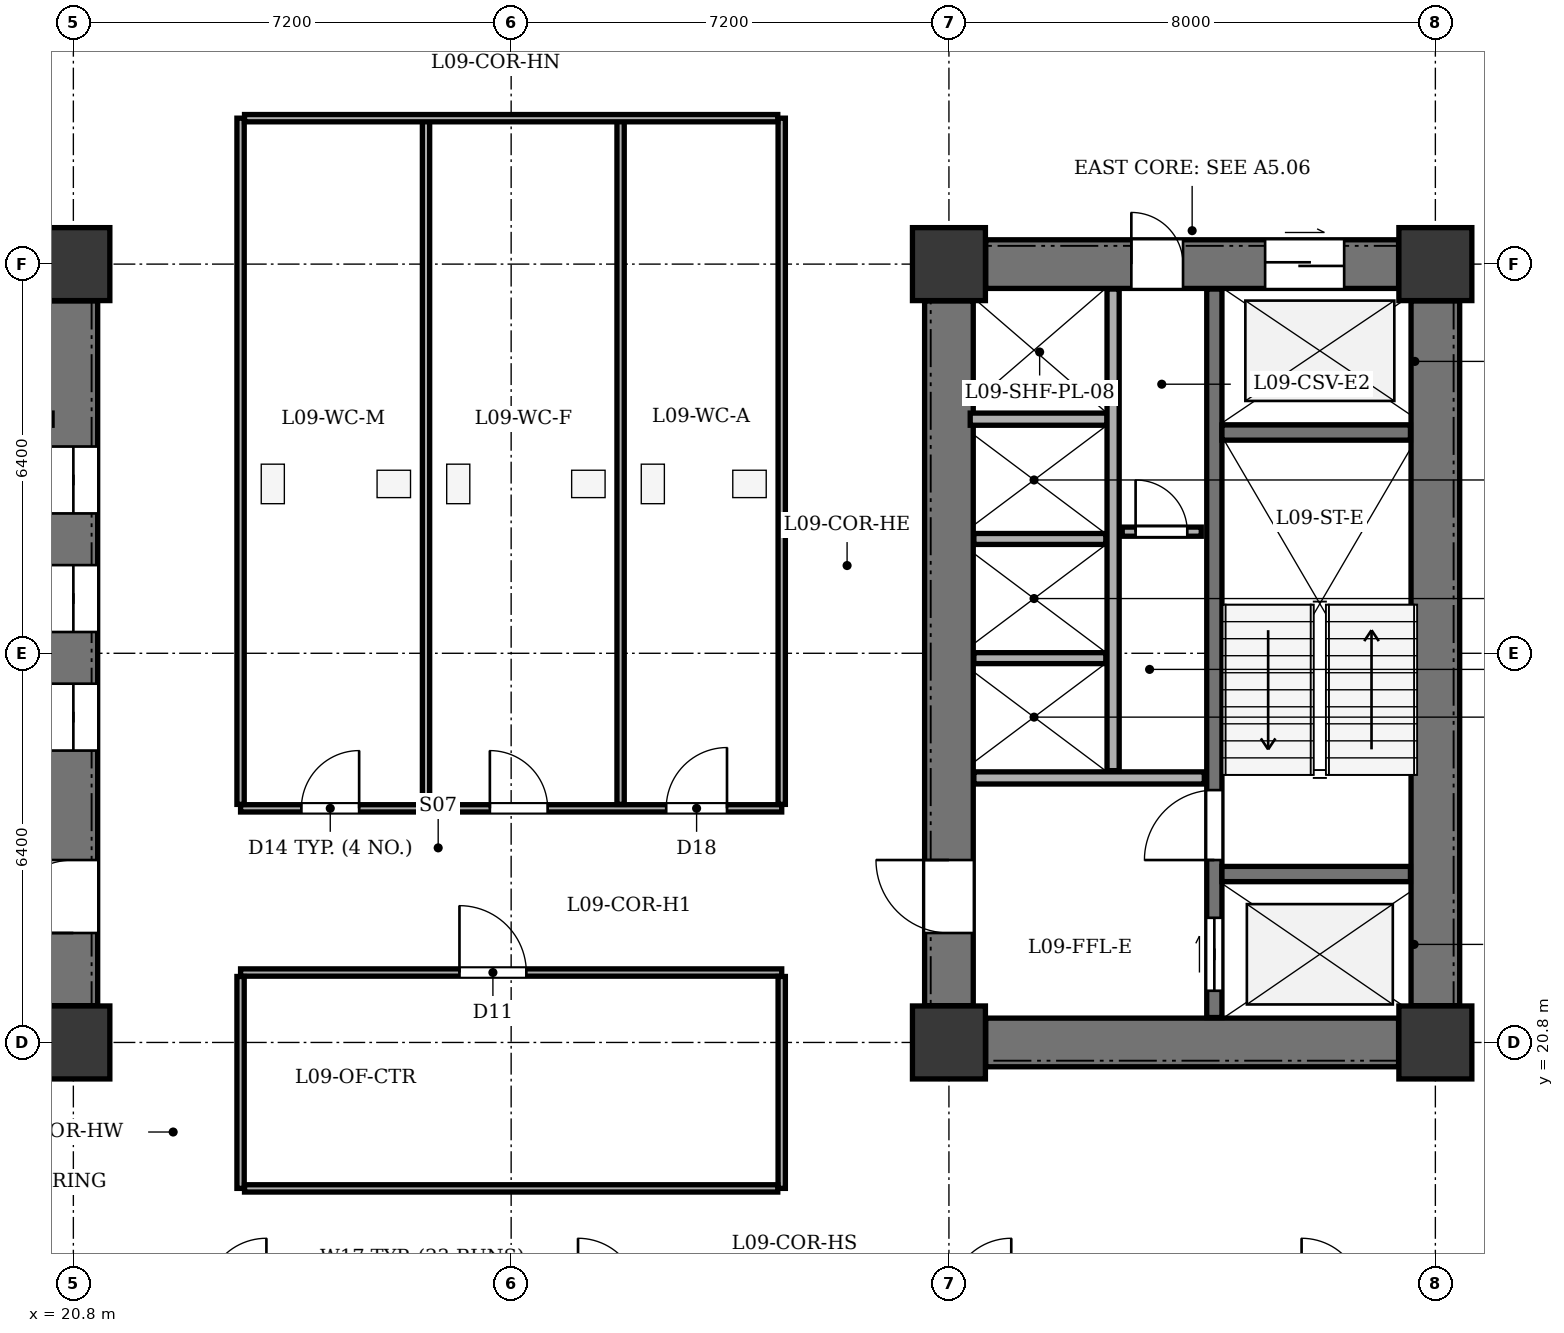
"""IFC4 building model, lengths in metres.
Left out: names, types, materials, properties, quantities, classifications, styles, units other than length and angle.
Written with IfcOpenShell. Run it as: python <this file> out.ifc"""

import sys

from ifc_helpers import new_model, si_unit, direction, frame, frame_2d, origin, origin_2d, place, context, subcontext, project, spatial, rectangle, extrude, element, fill, save


model = new_model("IFC4")
c1 = context("Model", 3, precision=1e-05, world=origin(), true_north=direction((0.0, 1.0)))
c2 = subcontext(c1, "Body", "Model", "MODEL_VIEW")
j1 = project(units=[si_unit("LENGTHUNIT", "METRE"), si_unit("PLANEANGLEUNIT", "RADIAN")], contexts=[c1])
p1 = place(None, origin())
s1 = spatial("IfcSite", under=j1, at=p1, CompositionType="ELEMENT")
p2 = place(p1, origin())
s2 = spatial("IfcBuilding", under=s1, at=p2, CompositionType="ELEMENT")
p3 = place(p2, frame((0.0, 0.0, 39.9)))
s3 = spatial("IfcBuildingStorey", under=s2, at=p3, CompositionType="ELEMENT", Elevation=39.9)
for number, where, z_axis, x_axis in (
    (1, (20.8, 20.8, 0.0), (0.0, 0.0, 1.0), (1.0, 0.0, 0.0)),
    (2, (20.8, 33.6, 0.0), (0.0, 0.0, 1.0), (1.0, 0.0, 0.0)),
    (3, (35.2, 20.8, 0.0), (0.0, 0.0, 1.0), (1.0, 0.0, 0.0)),
    (4, (43.2, 20.8, 0.0), (0.0, 0.0, 1.0), (1.0, 0.0, 0.0)),
    (5, (35.2, 33.6, 0.0), (0.0, 0.0, 1.0), (1.0, 0.0, 0.0)),
    (6, (43.2, 33.6, 0.0), (0.0, 0.0, 1.0), (1.0, 0.0, 0.0)),
):
    element("IfcColumn", number, at=place(p3, frame(where, z_axis=z_axis, x_axis=x_axis)), inside=s3, PredefinedType="COLUMN", context=c2, shape_type="SweptSolid", body=[
        extrude(rectangle(XDim=1.2, YDim=1.2, at=origin_2d()), origin(), (0.0, 0.0, 1.0), 3.9),
    ])
p4 = place(p3, frame((20.8, 21.405, 0.0), z_axis=(0.0, 0.0, 1.0), x_axis=(0.0, 1.0, 0.0)))
e7 = element("IfcWall", 7, at=p4, inside=s3, PredefinedType="SHEAR", context=c2, shape_type="SweptSolid", body=[
    extrude(rectangle(XDim=11.59, YDim=0.8, at=frame_2d((5.795, 0.0))), origin(), (0.0, 0.0, 1.0), 3.6),
])
p5 = place(p4, frame((1.195, 0.0, 0.0)))
e8 = element("IfcOpeningElement", 8, at=p5, cuts=e7, PredefinedType="OPENING", context=c2, shape_type="SweptSolid", body=[
    extrude(rectangle(XDim=1.2, YDim=2.15, at=frame_2d((0.6, 1.075))), frame((0.0, 0.41, 0.0), z_axis=(0.0, -1.0, 0.0), x_axis=(1.0, 0.0, 0.0)), (0.0, 0.0, 1.0), 0.82),
])
p6 = place(p4, frame((4.195, 0.0, 0.0)))
e9 = element("IfcOpeningElement", 9, at=p6, cuts=e7, PredefinedType="OPENING", context=c2, shape_type="SweptSolid", body=[
    extrude(rectangle(XDim=1.1, YDim=2.1, at=frame_2d((0.55, 1.05))), frame((0.0, 0.41, 0.0), z_axis=(0.0, -1.0, 0.0), x_axis=(1.0, 0.0, 0.0)), (0.0, 0.0, 1.0), 0.82),
])
p7 = place(p4, frame((6.145, 0.0, 0.0)))
e10 = element("IfcOpeningElement", 10, at=p7, cuts=e7, PredefinedType="OPENING", context=c2, shape_type="SweptSolid", body=[
    extrude(rectangle(XDim=1.1, YDim=2.1, at=frame_2d((0.55, 1.05))), frame((0.0, 0.41, 0.0), z_axis=(0.0, -1.0, 0.0), x_axis=(1.0, 0.0, 0.0)), (0.0, 0.0, 1.0), 0.82),
])
p8 = place(p4, frame((8.095, 0.0, 0.0)))
e11 = element("IfcOpeningElement", 11, at=p8, cuts=e7, PredefinedType="OPENING", context=c2, shape_type="SweptSolid", body=[
    extrude(rectangle(XDim=1.1, YDim=2.1, at=frame_2d((0.55, 1.05))), frame((0.0, 0.41, 0.0), z_axis=(0.0, -1.0, 0.0), x_axis=(1.0, 0.0, 0.0)), (0.0, 0.0, 1.0), 0.82),
])
p9 = place(p3, frame((43.2, 21.405, 0.0), z_axis=(0.0, 0.0, 1.0), x_axis=(0.0, 1.0, 0.0)))
e12 = element("IfcWall", 12, at=p9, inside=s3, PredefinedType="SHEAR", context=c2, shape_type="SweptSolid", body=[
    extrude(rectangle(XDim=11.59, YDim=0.8, at=frame_2d((5.795, 0.0))), origin(), (0.0, 0.0, 1.0), 3.6),
])
p10 = place(p3, frame((35.805, 20.8, 0.0), z_axis=(0.0, 0.0, 1.0), x_axis=(1.0, 0.0, 0.0)))
e13 = element("IfcWall", 13, at=p10, inside=s3, PredefinedType="SHEAR", context=c2, shape_type="SweptSolid", body=[
    extrude(rectangle(XDim=6.79, YDim=0.8, at=frame_2d((3.395, 0.0))), origin(), (0.0, 0.0, 1.0), 3.6),
])
p11 = place(p3, frame((35.805, 33.6, 0.0), z_axis=(0.0, 0.0, 1.0), x_axis=(1.0, 0.0, 0.0)))
e14 = element("IfcWall", 14, at=p11, inside=s3, PredefinedType="SHEAR", context=c2, shape_type="SweptSolid", body=[
    extrude(rectangle(XDim=6.79, YDim=0.8, at=frame_2d((3.395, 0.0))), origin(), (0.0, 0.0, 1.0), 3.6),
])
p12 = place(p11, frame((4.595, 0.0, 0.0)))
e15 = element("IfcOpeningElement", 15, at=p12, cuts=e14, PredefinedType="OPENING", context=c2, shape_type="SweptSolid", body=[
    extrude(rectangle(XDim=1.3, YDim=2.15, at=frame_2d((0.65, 1.075))), frame((0.0, 0.41, 0.0), z_axis=(0.0, -1.0, 0.0), x_axis=(1.0, 0.0, 0.0)), (0.0, 0.0, 1.0), 0.82),
])
p13 = place(p11, frame((2.395, 0.0, 0.0)))
e16 = element("IfcOpeningElement", 16, at=p13, cuts=e14, PredefinedType="OPENING", context=c2, shape_type="SweptSolid", body=[
    extrude(rectangle(XDim=0.85, YDim=2.02, at=frame_2d((0.425, 1.01))), frame((0.0, 0.41, 0.0), z_axis=(0.0, -1.0, 0.0), x_axis=(1.0, 0.0, 0.0)), (0.0, 0.0, 1.0), 0.82),
])
p14 = place(p3, frame((35.2, 21.405, 0.0), z_axis=(0.0, 0.0, 1.0), x_axis=(0.0, 1.0, 0.0)))
e17 = element("IfcWall", 17, at=p14, inside=s3, PredefinedType="SHEAR", context=c2, shape_type="SweptSolid", body=[
    extrude(rectangle(XDim=11.59, YDim=0.8, at=frame_2d((5.795, 0.0))), origin(), (0.0, 0.0, 1.0), 3.6),
])
p15 = place(p14, frame((1.195, 0.0, 0.0)))
e18 = element("IfcOpeningElement", 18, at=p15, cuts=e17, PredefinedType="OPENING", context=c2, shape_type="SweptSolid", body=[
    extrude(rectangle(XDim=1.2, YDim=2.15, at=frame_2d((0.6, 1.075))), frame((0.0, 0.41, 0.0), z_axis=(0.0, -1.0, 0.0), x_axis=(1.0, 0.0, 0.0)), (0.0, 0.0, 1.0), 0.82),
])
p16 = place(p3, frame((39.565, 21.21, 0.0), z_axis=(0.0, 0.0, 1.0), x_axis=(0.0, 1.0, 0.0)))
e19 = element("IfcWall", 19, at=p16, inside=s3, PredefinedType="SHEAR", context=c2, shape_type="SweptSolid", body=[
    extrude(rectangle(XDim=11.98, YDim=0.25, at=frame_2d((5.99, 0.0))), origin(), (0.0, 0.0, 1.0), 3.6),
])
p17 = place(p16, frame((0.44, 0.0, 0.0)))
e20 = element("IfcOpeningElement", 20, at=p17, cuts=e19, PredefinedType="OPENING", context=c2, shape_type="SweptSolid", body=[
    extrude(rectangle(XDim=1.2, YDim=2.15, at=frame_2d((0.6, 1.075))), frame((0.0, 0.135, 0.0), z_axis=(0.0, -1.0, 0.0), x_axis=(1.0, 0.0, 0.0)), (0.0, 0.0, 1.0), 0.27),
])
p18 = place(p16, frame((2.59, 0.0, 0.0)))
e21 = element("IfcOpeningElement", 21, at=p18, cuts=e19, PredefinedType="OPENING", context=c2, shape_type="SweptSolid", body=[
    extrude(rectangle(XDim=1.15, YDim=2.15, at=frame_2d((0.575, 1.075))), frame((0.0, 0.135, 0.0), z_axis=(0.0, -1.0, 0.0), x_axis=(1.0, 0.0, 0.0)), (0.0, 0.0, 1.0), 0.27),
])
for number, where, z_axis, x_axis in (
    (22, (39.69, 23.57, 0.0), (0.0, 0.0, 1.0), (1.0, 0.0, 0.0)),
    (23, (39.69, 30.83, 0.0), (0.0, 0.0, 1.0), (1.0, 0.0, 0.0)),
):
    element("IfcWall", number, at=place(p3, frame(where, z_axis=z_axis, x_axis=x_axis)), inside=s3, PredefinedType="SHEAR", context=c2, shape_type="SweptSolid", body=[
        extrude(rectangle(XDim=3.1, YDim=0.25, at=frame_2d((1.55, 0.0))), origin(), (0.0, 0.0, 1.0), 3.6),
    ])
p19 = place(p3, frame((35.61, 25.15, 0.0), z_axis=(0.0, 0.0, 1.0), x_axis=(1.0, 0.0, 0.0)))
e24 = element("IfcWall", 24, at=p19, inside=s3, PredefinedType="SOLIDWALL", context=c2, shape_type="SweptSolid", body=[
    extrude(rectangle(XDim=3.79, YDim=0.2, at=frame_2d((1.895, 0.0))), origin(), (0.0, 0.0, 1.0), 3.6),
])
p20 = place(p3, frame((35.55, 31.05, 0.0), z_axis=(0.0, 0.0, 1.0), x_axis=(1.0, 0.0, 0.0)))
e25 = element("IfcWall", 25, at=p20, inside=s3, PredefinedType="SOLIDWALL", context=c2, shape_type="SweptSolid", body=[
    extrude(rectangle(XDim=2.25, YDim=0.2, at=frame_2d((1.125, 0.0))), origin(), (0.0, 0.0, 1.0), 3.6),
])
p21 = place(p3, frame((37.9, 25.27, 0.0), z_axis=(0.0, 0.0, 1.0), x_axis=(0.0, 1.0, 0.0)))
e26 = element("IfcWall", 26, at=p21, inside=s3, PredefinedType="SOLIDWALL", context=c2, shape_type="SweptSolid", body=[
    extrude(rectangle(XDim=7.92, YDim=0.2, at=frame_2d((3.96, 0.0))), origin(), (0.0, 0.0, 1.0), 3.6),
])
for number, where, z_axis, x_axis in (
    (27, (35.61, 27.12, 0.0), (0.0, 0.0, 1.0), (1.0, 0.0, 0.0)),
    (28, (35.61, 29.08, 0.0), (0.0, 0.0, 1.0), (1.0, 0.0, 0.0)),
):
    element("IfcWall", number, at=place(p3, frame(where, z_axis=z_axis, x_axis=x_axis)), inside=s3, PredefinedType="PARTITIONING", context=c2, shape_type="SweptSolid", body=[
        extrude(rectangle(XDim=2.17, YDim=0.18, at=frame_2d((1.085, 0.0))), origin(), (0.0, 0.0, 1.0), 3.6),
    ])
p22 = place(p3, frame((38.05, 29.2, 0.0), z_axis=(0.0, 0.0, 1.0), x_axis=(1.0, 0.0, 0.0)))
e29 = element("IfcWall", 29, at=p22, inside=s3, PredefinedType="PARTITIONING", context=c2, shape_type="SweptSolid", body=[
    extrude(rectangle(XDim=1.3, YDim=0.15, at=frame_2d((0.65, 0.0))), origin(), (0.0, 0.0, 1.0), 3.6),
])
p23 = place(p22, frame((0.22, 0.0, 0.0)))
e30 = element("IfcOpeningElement", 30, at=p23, cuts=e29, PredefinedType="OPENING", context=c2, shape_type="SweptSolid", body=[
    extrude(rectangle(XDim=0.85, YDim=2.02, at=frame_2d((0.425, 1.01))), frame((0.0, 0.085, 0.0), z_axis=(0.0, -1.0, 0.0), x_axis=(1.0, 0.0, 0.0)), (0.0, 0.0, 1.0), 0.17),
])
p24 = place(p3, frame((23.55, 24.65, 0.0), z_axis=(0.0, 0.0, 1.0), x_axis=(1.0, 0.0, 0.0)))
e31 = element("IfcWall", 31, at=p24, inside=s3, PredefinedType="PARTITIONING", context=c2, shape_type="SweptSolid", body=[
    extrude(rectangle(XDim=8.9, YDim=0.12, at=frame_2d((4.45, 0.0))), origin(), (0.0, 0.0, 1.0), 3.135),
])
p25 = place(p24, frame((1.0, 0.0, 0.0)))
e32 = element("IfcOpeningElement", 32, at=p25, cuts=e31, PredefinedType="OPENING", context=c2, shape_type="SweptSolid", body=[
    extrude(rectangle(XDim=0.95, YDim=2.1, at=frame_2d((0.475, 1.05))), frame((0.0, 0.07, 0.0), z_axis=(0.0, -1.0, 0.0), x_axis=(1.0, 0.0, 0.0)), (0.0, 0.0, 1.0), 0.14),
])
p26 = place(p24, frame((4.1, 0.0, 0.0)))
e33 = element("IfcOpeningElement", 33, at=p26, cuts=e31, PredefinedType="OPENING", context=c2, shape_type="SweptSolid", body=[
    extrude(rectangle(XDim=0.95, YDim=2.1, at=frame_2d((0.475, 1.05))), frame((0.0, 0.07, 0.0), z_axis=(0.0, -1.0, 0.0), x_axis=(1.0, 0.0, 0.0)), (0.0, 0.0, 1.0), 0.14),
])
p27 = place(p24, frame((7.0, 0.0, 0.0)))
e34 = element("IfcOpeningElement", 34, at=p27, cuts=e31, PredefinedType="OPENING", context=c2, shape_type="SweptSolid", body=[
    extrude(rectangle(XDim=1.0, YDim=2.1, at=frame_2d((0.5, 1.05))), frame((0.0, 0.07, 0.0), z_axis=(0.0, -1.0, 0.0), x_axis=(1.0, 0.0, 0.0)), (0.0, 0.0, 1.0), 0.14),
])
for number, where, z_axis, x_axis in (
    (35, (23.55, 24.715, 0.0), (0.0, 0.0, 1.0), (0.0, 1.0, 0.0)),
    (36, (32.45, 24.715, 0.0), (0.0, 0.0, 1.0), (0.0, 1.0, 0.0)),
    (37, (26.6, 24.715, 0.0), (0.0, 0.0, 1.0), (0.0, 1.0, 0.0)),
):
    element("IfcWall", number, at=place(p3, frame(where, z_axis=z_axis, x_axis=x_axis)), inside=s3, PredefinedType="PARTITIONING", context=c2, shape_type="SweptSolid", body=[
        extrude(rectangle(XDim=11.285, YDim=0.12, at=frame_2d((5.643, 0.0))), origin(), (0.0, 0.0, 1.0), 3.6),
    ])
p28 = place(p3, frame((29.8, 24.715, 0.0), z_axis=(0.0, 0.0, 1.0), x_axis=(0.0, 1.0, 0.0)))
e38 = element("IfcWall", 38, at=p28, inside=s3, PredefinedType="PARTITIONING", context=c2, shape_type="SweptSolid", body=[
    extrude(rectangle(XDim=11.285, YDim=0.12, at=frame_2d((5.643, 0.0))), origin(), (0.0, 0.0, 1.0), 3.135),
])
p29 = place(p3, frame((23.615, 36.0, 0.0), z_axis=(0.0, 0.0, 1.0), x_axis=(1.0, 0.0, 0.0)))
e39 = element("IfcWall", 39, at=p29, inside=s3, PredefinedType="PARTITIONING", context=c2, shape_type="SweptSolid", body=[
    extrude(rectangle(XDim=8.77, YDim=0.12, at=frame_2d((4.385, 0.0))), origin(), (0.0, 0.0, 1.0), 3.6),
])
p30 = place(p3, frame((23.55, 21.95, 0.0), z_axis=(0.0, 0.0, 1.0), x_axis=(1.0, 0.0, 0.0)))
e40 = element("IfcWall", 40, at=p30, inside=s3, PredefinedType="PARTITIONING", context=c2, shape_type="SweptSolid", body=[
    extrude(rectangle(XDim=8.9, YDim=0.12, at=frame_2d((4.45, 0.0))), origin(), (0.0, 0.0, 1.0), 3.135),
])
p31 = place(p30, frame((3.6, 0.0, 0.0)))
e41 = element("IfcOpeningElement", 41, at=p31, cuts=e40, PredefinedType="OPENING", context=c2, shape_type="SweptSolid", body=[
    extrude(rectangle(XDim=1.1, YDim=2.15, at=frame_2d((0.55, 1.075))), frame((0.0, 0.07, 0.0), z_axis=(0.0, -1.0, 0.0), x_axis=(1.0, 0.0, 0.0)), (0.0, 0.0, 1.0), 0.14),
])
for number, where, z_axis, x_axis in (
    (42, (23.55, 18.4, 0.0), (0.0, 0.0, 1.0), (0.0, 1.0, 0.0)),
    (43, (32.45, 18.4, 0.0), (0.0, 0.0, 1.0), (0.0, 1.0, 0.0)),
):
    element("IfcWall", number, at=place(p3, frame(where, z_axis=z_axis, x_axis=x_axis)), inside=s3, PredefinedType="PARTITIONING", context=c2, shape_type="SweptSolid", body=[
        extrude(rectangle(XDim=3.485, YDim=0.12, at=frame_2d((1.743, 0.0))), origin(), (0.0, 0.0, 1.0), 3.6),
    ])
p32 = place(p3, frame((23.615, 18.4, 0.0), z_axis=(0.0, 0.0, 1.0), x_axis=(1.0, 0.0, 0.0)))
e44 = element("IfcWall", 44, at=p32, inside=s3, PredefinedType="PARTITIONING", context=c2, shape_type="SweptSolid", body=[
    extrude(rectangle(XDim=8.77, YDim=0.12, at=frame_2d((4.385, 0.0))), origin(), (0.0, 0.0, 1.0), 3.6),
])
p33 = place(p5, origin())
e45 = element("IfcDoor", 45, at=p33, inside=s3, OperationType="SINGLE_SWING_LEFT", PredefinedType="DOOR", context=c2, shape_type="SweptSolid", body=[
    extrude(rectangle(XDim=1.2, YDim=2.15, at=frame_2d((0.6, 1.075))), frame((0.0, 0.025, 0.0), z_axis=(0.0, -1.0, 0.0), x_axis=(1.0, 0.0, 0.0)), (0.0, 0.0, 1.0), 0.05),
])
fill(e8, e45)
p34 = place(p6, origin())
e46 = element("IfcDoor", 46, at=p34, inside=s3, OperationType="DOUBLE_DOOR_SLIDING", PredefinedType="DOOR", context=c2, shape_type="SweptSolid", body=[
    extrude(rectangle(XDim=1.1, YDim=2.1, at=frame_2d((0.55, 1.05))), frame((0.0, 0.025, 0.0), z_axis=(0.0, -1.0, 0.0), x_axis=(1.0, 0.0, 0.0)), (0.0, 0.0, 1.0), 0.05),
])
fill(e9, e46)
p35 = place(p7, origin())
e47 = element("IfcDoor", 47, at=p35, inside=s3, OperationType="DOUBLE_DOOR_SLIDING", PredefinedType="DOOR", context=c2, shape_type="SweptSolid", body=[
    extrude(rectangle(XDim=1.1, YDim=2.1, at=frame_2d((0.55, 1.05))), frame((0.0, 0.025, 0.0), z_axis=(0.0, -1.0, 0.0), x_axis=(1.0, 0.0, 0.0)), (0.0, 0.0, 1.0), 0.05),
])
fill(e10, e47)
p36 = place(p8, origin())
e48 = element("IfcDoor", 48, at=p36, inside=s3, OperationType="DOUBLE_DOOR_SLIDING", PredefinedType="DOOR", context=c2, shape_type="SweptSolid", body=[
    extrude(rectangle(XDim=1.1, YDim=2.1, at=frame_2d((0.55, 1.05))), frame((0.0, 0.025, 0.0), z_axis=(0.0, -1.0, 0.0), x_axis=(1.0, 0.0, 0.0)), (0.0, 0.0, 1.0), 0.05),
])
fill(e11, e48)
p37 = place(p12, origin())
e49 = element("IfcDoor", 49, at=p37, inside=s3, OperationType="DOUBLE_DOOR_SLIDING", PredefinedType="DOOR", context=c2, shape_type="SweptSolid", body=[
    extrude(rectangle(XDim=1.3, YDim=2.15, at=frame_2d((0.65, 1.075))), frame((0.0, 0.025, 0.0), z_axis=(0.0, -1.0, 0.0), x_axis=(1.0, 0.0, 0.0)), (0.0, 0.0, 1.0), 0.05),
])
fill(e15, e49)
p38 = place(p13, origin())
e50 = element("IfcDoor", 50, at=p38, inside=s3, OperationType="SINGLE_SWING_LEFT", PredefinedType="DOOR", context=c2, shape_type="SweptSolid", body=[
    extrude(rectangle(XDim=0.85, YDim=2.02, at=frame_2d((0.425, 1.01))), frame((0.0, 0.025, 0.0), z_axis=(0.0, -1.0, 0.0), x_axis=(1.0, 0.0, 0.0)), (0.0, 0.0, 1.0), 0.05),
])
fill(e16, e50)
p39 = place(p15, origin())
e51 = element("IfcDoor", 51, at=p39, inside=s3, OperationType="SINGLE_SWING_RIGHT", PredefinedType="DOOR", context=c2, shape_type="SweptSolid", body=[
    extrude(rectangle(XDim=1.2, YDim=2.15, at=frame_2d((0.6, 1.075))), frame((0.0, 0.025, 0.0), z_axis=(0.0, -1.0, 0.0), x_axis=(1.0, 0.0, 0.0)), (0.0, 0.0, 1.0), 0.05),
])
fill(e18, e51)
p40 = place(p17, origin())
e52 = element("IfcDoor", 52, at=p40, inside=s3, OperationType="DOUBLE_DOOR_SLIDING", PredefinedType="DOOR", context=c2, shape_type="SweptSolid", body=[
    extrude(rectangle(XDim=1.2, YDim=2.15, at=frame_2d((0.6, 1.075))), frame((0.0, 0.025, 0.0), z_axis=(0.0, -1.0, 0.0), x_axis=(1.0, 0.0, 0.0)), (0.0, 0.0, 1.0), 0.05),
])
fill(e20, e52)
p41 = place(p18, origin())
e53 = element("IfcDoor", 53, at=p41, inside=s3, OperationType="SINGLE_SWING_LEFT", PredefinedType="DOOR", context=c2, shape_type="SweptSolid", body=[
    extrude(rectangle(XDim=1.15, YDim=2.15, at=frame_2d((0.575, 1.075))), frame((0.0, 0.025, 0.0), z_axis=(0.0, -1.0, 0.0), x_axis=(1.0, 0.0, 0.0)), (0.0, 0.0, 1.0), 0.05),
])
fill(e21, e53)
p42 = place(p23, origin())
e54 = element("IfcDoor", 54, at=p42, inside=s3, OperationType="SINGLE_SWING_LEFT", PredefinedType="DOOR", context=c2, shape_type="SweptSolid", body=[
    extrude(rectangle(XDim=0.85, YDim=2.02, at=frame_2d((0.425, 1.01))), frame((0.0, 0.025, 0.0), z_axis=(0.0, -1.0, 0.0), x_axis=(1.0, 0.0, 0.0)), (0.0, 0.0, 1.0), 0.05),
])
fill(e30, e54)
p43 = place(p25, origin())
e55 = element("IfcDoor", 55, at=p43, inside=s3, OperationType="SINGLE_SWING_RIGHT", PredefinedType="DOOR", context=c2, shape_type="SweptSolid", body=[
    extrude(rectangle(XDim=0.95, YDim=2.1, at=frame_2d((0.475, 1.05))), frame((0.0, 0.025, 0.0), z_axis=(0.0, -1.0, 0.0), x_axis=(1.0, 0.0, 0.0)), (0.0, 0.0, 1.0), 0.05),
])
fill(e32, e55)
p44 = place(p26, origin())
e56 = element("IfcDoor", 56, at=p44, inside=s3, OperationType="SINGLE_SWING_LEFT", PredefinedType="DOOR", context=c2, shape_type="SweptSolid", body=[
    extrude(rectangle(XDim=0.95, YDim=2.1, at=frame_2d((0.475, 1.05))), frame((0.0, 0.025, 0.0), z_axis=(0.0, -1.0, 0.0), x_axis=(1.0, 0.0, 0.0)), (0.0, 0.0, 1.0), 0.05),
])
fill(e33, e56)
p45 = place(p27, origin())
e57 = element("IfcDoor", 57, at=p45, inside=s3, OperationType="SINGLE_SWING_RIGHT", PredefinedType="DOOR", context=c2, shape_type="SweptSolid", body=[
    extrude(rectangle(XDim=1.0, YDim=2.1, at=frame_2d((0.5, 1.05))), frame((0.0, 0.025, 0.0), z_axis=(0.0, -1.0, 0.0), x_axis=(1.0, 0.0, 0.0)), (0.0, 0.0, 1.0), 0.05),
])
fill(e34, e57)
p46 = place(p31, origin())
e58 = element("IfcDoor", 58, at=p46, inside=s3, OperationType="SINGLE_SWING_LEFT", PredefinedType="DOOR", context=c2, shape_type="SweptSolid", body=[
    extrude(rectangle(XDim=1.1, YDim=2.15, at=frame_2d((0.55, 1.075))), frame((0.0, 0.025, 0.0), z_axis=(0.0, -1.0, 0.0), x_axis=(1.0, 0.0, 0.0)), (0.0, 0.0, 1.0), 0.05),
])
fill(e41, e58)
save(model, sys.argv[1])
